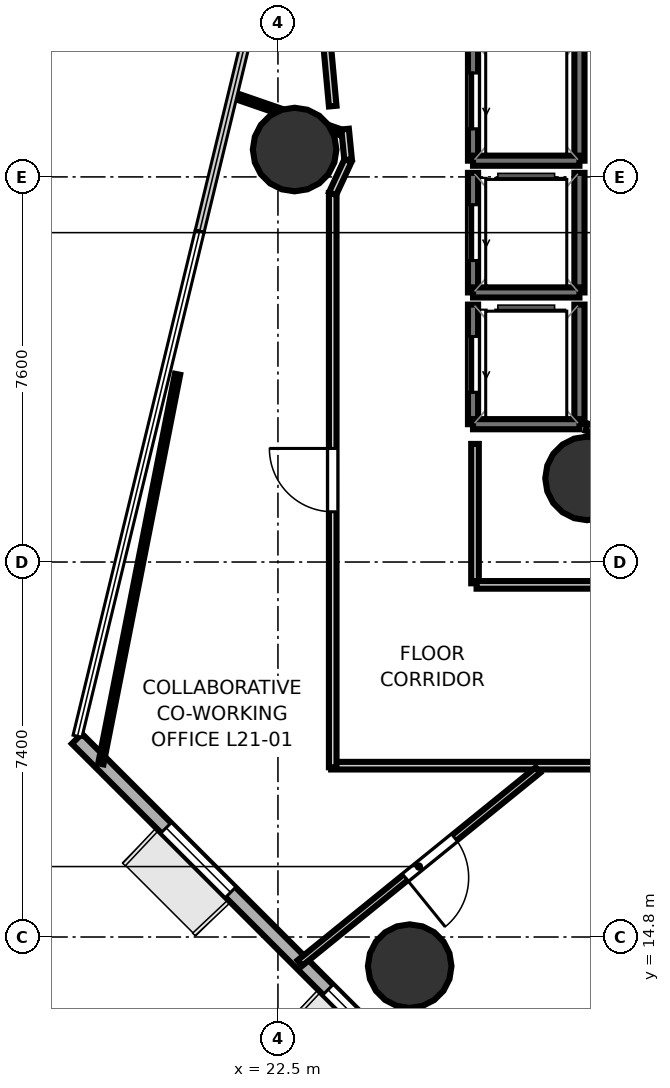
"""IFC4 building model, lengths in metres.
Left out: names, types, materials, properties, quantities, classifications, styles, units other than length and angle.
Written with IfcOpenShell. Run it as: python <this file> out.ifc"""

import sys

from ifc_helpers import new_model, si_unit, direction, frame, frame_2d, origin, origin_2d, place, context, subcontext, project, spatial, rectangle, hollow_circle, extrude, element, fill, save


model = new_model("IFC4")
c1 = context("Model", 3, precision=1e-05, world=origin(), true_north=direction((0.0, 1.0)))
c2 = subcontext(c1, "Body", "Model", "MODEL_VIEW")
j1 = project(units=[si_unit("LENGTHUNIT", "METRE"), si_unit("PLANEANGLEUNIT", "RADIAN")], contexts=[c1])
p1 = place(None, origin())
s1 = spatial("IfcSite", under=j1, at=p1, CompositionType="ELEMENT")
p2 = place(p1, origin())
s2 = spatial("IfcBuilding", under=s1, at=p2, CompositionType="ELEMENT")
p3 = place(p2, frame((0.0, 0.0, 85.8)))
s3 = spatial("IfcBuildingStorey", under=s2, at=p3, CompositionType="ELEMENT", Elevation=85.8)
for number, where, z_axis, x_axis in (
    (1, (28.6, 23.85, 0.0), (0.0, 0.0, 1.0), (1.0, 0.0, 0.0)),
    (2, (22.829, 30.34, 0.0), (0.0, 0.0, 1.0), (1.0, 0.0, 0.0)),
    (3, (25.1, 14.225, 0.0), (0.0, 0.0, 1.0), (1.0, 0.0, 0.0)),
):
    element("IfcColumn", number, at=place(p3, frame(where, z_axis=z_axis, x_axis=x_axis)), inside=s3, PredefinedType="COLUMN", context=c2, shape_type="SweptSolid", body=[
        extrude(hollow_circle(Radius=0.825, WallThickness=0.04, at=origin_2d()), origin(), (0.0, 0.0, 1.0), 3.7),
    ])
p4 = place(p3, frame((18.532, 18.713, 0.0), z_axis=(0.0, 0.0, 1.0), x_axis=(0.707279667922, -0.70693385217, 0.0)))
e4 = element("IfcWall", 4, at=p4, inside=s3, PredefinedType="SOLIDWALL", context=c2, shape_type="SweptSolid", body=[
    extrude(rectangle(XDim=11.296, YDim=0.28, at=frame_2d((5.648, 0.0))), origin(), (0.0, 0.0, 1.0), 3.52),
])
p5 = place(p4, frame((2.489, 0.0, 0.85)))
e5 = element("IfcOpeningElement", 5, at=p5, cuts=e4, PredefinedType="OPENING", context=c2, shape_type="SweptSolid", body=[
    extrude(rectangle(XDim=1.8, YDim=2.1, at=frame_2d((0.9, 1.05))), frame((0.0, 0.15, 0.0), z_axis=(0.0, -1.0, 0.0), x_axis=(1.0, 0.0, 0.0)), (0.0, 0.0, 1.0), 0.3),
])
p6 = place(p4, frame((7.007, 0.0, 0.85)))
e6 = element("IfcOpeningElement", 6, at=p6, cuts=e4, PredefinedType="OPENING", context=c2, shape_type="SweptSolid", body=[
    extrude(rectangle(XDim=1.8, YDim=2.1, at=frame_2d((0.9, 1.05))), frame((0.0, 0.15, 0.0), z_axis=(0.0, -1.0, 0.0), x_axis=(1.0, 0.0, 0.0)), (0.0, 0.0, 1.0), 0.3),
])
p7 = place(p3, frame((28.45, 30.12, 0.0), z_axis=(0.0, 0.0, 1.0), x_axis=(0.0, 1.0, 0.0)))
e7 = element("IfcWall", 7, at=p7, inside=s3, PredefinedType="SOLIDWALL", context=c2, shape_type="SweptSolid", body=[
    extrude(rectangle(XDim=2.36, YDim=0.2, at=frame_2d((1.18, 0.0))), origin(), (0.0, 0.0, 1.0), 3.52),
])
p8 = place(p3, frame((26.35, 30.12, 0.0), z_axis=(0.0, 0.0, 1.0), x_axis=(0.0, 1.0, 0.0)))
e8 = element("IfcWall", 8, at=p8, inside=s3, PredefinedType="SOLIDWALL", context=c2, shape_type="SweptSolid", body=[
    extrude(rectangle(XDim=2.36, YDim=0.2, at=frame_2d((1.18, 0.0))), origin(), (0.0, 0.0, 1.0), 3.52),
])
p9 = place(p8, frame((0.63, 0.0, 0.0)))
e9 = element("IfcOpeningElement", 9, at=p9, cuts=e8, PredefinedType="OPENING", context=c2, shape_type="SweptSolid", body=[
    extrude(rectangle(XDim=1.1, YDim=2.15, at=frame_2d((0.55, 1.075))), frame((0.0, 0.11, 0.0), z_axis=(0.0, -1.0, 0.0), x_axis=(1.0, 0.0, 0.0)), (0.0, 0.0, 1.0), 0.22),
])
p10 = place(p3, frame((26.35, 30.12, 0.0), z_axis=(0.0, 0.0, 1.0), x_axis=(1.0, 0.0, 0.0)))
e10 = element("IfcWall", 10, at=p10, inside=s3, PredefinedType="SOLIDWALL", context=c2, shape_type="SweptSolid", body=[
    extrude(rectangle(XDim=2.1, YDim=0.2, at=frame_2d((1.05, 0.0))), origin(), (0.0, 0.0, 1.0), 3.52),
])
p11 = place(p3, frame((28.45, 27.52, 0.0), z_axis=(0.0, 0.0, 1.0), x_axis=(0.0, 1.0, 0.0)))
e11 = element("IfcWall", 11, at=p11, inside=s3, PredefinedType="SOLIDWALL", context=c2, shape_type="SweptSolid", body=[
    extrude(rectangle(XDim=2.36, YDim=0.2, at=frame_2d((1.18, 0.0))), origin(), (0.0, 0.0, 1.0), 3.52),
])
p12 = place(p3, frame((26.35, 27.52, 0.0), z_axis=(0.0, 0.0, 1.0), x_axis=(0.0, 1.0, 0.0)))
e12 = element("IfcWall", 12, at=p12, inside=s3, PredefinedType="SOLIDWALL", context=c2, shape_type="SweptSolid", body=[
    extrude(rectangle(XDim=2.36, YDim=0.2, at=frame_2d((1.18, 0.0))), origin(), (0.0, 0.0, 1.0), 3.52),
])
p13 = place(p12, frame((0.63, 0.0, 0.0)))
e13 = element("IfcOpeningElement", 13, at=p13, cuts=e12, PredefinedType="OPENING", context=c2, shape_type="SweptSolid", body=[
    extrude(rectangle(XDim=1.1, YDim=2.15, at=frame_2d((0.55, 1.075))), frame((0.0, 0.11, 0.0), z_axis=(0.0, -1.0, 0.0), x_axis=(1.0, 0.0, 0.0)), (0.0, 0.0, 1.0), 0.22),
])
p14 = place(p3, frame((26.35, 27.52, 0.0), z_axis=(0.0, 0.0, 1.0), x_axis=(1.0, 0.0, 0.0)))
e14 = element("IfcWall", 14, at=p14, inside=s3, PredefinedType="SOLIDWALL", context=c2, shape_type="SweptSolid", body=[
    extrude(rectangle(XDim=2.1, YDim=0.2, at=frame_2d((1.05, 0.0))), origin(), (0.0, 0.0, 1.0), 3.52),
])
p15 = place(p3, frame((28.45, 24.92, 0.0), z_axis=(0.0, 0.0, 1.0), x_axis=(0.0, 1.0, 0.0)))
e15 = element("IfcWall", 15, at=p15, inside=s3, PredefinedType="SOLIDWALL", context=c2, shape_type="SweptSolid", body=[
    extrude(rectangle(XDim=2.36, YDim=0.2, at=frame_2d((1.18, 0.0))), origin(), (0.0, 0.0, 1.0), 3.52),
])
p16 = place(p3, frame((26.35, 24.92, 0.0), z_axis=(0.0, 0.0, 1.0), x_axis=(0.0, 1.0, 0.0)))
e16 = element("IfcWall", 16, at=p16, inside=s3, PredefinedType="SOLIDWALL", context=c2, shape_type="SweptSolid", body=[
    extrude(rectangle(XDim=2.36, YDim=0.2, at=frame_2d((1.18, 0.0))), origin(), (0.0, 0.0, 1.0), 3.52),
])
p17 = place(p16, frame((0.63, 0.0, 0.0)))
e17 = element("IfcOpeningElement", 17, at=p17, cuts=e16, PredefinedType="OPENING", context=c2, shape_type="SweptSolid", body=[
    extrude(rectangle(XDim=1.1, YDim=2.15, at=frame_2d((0.55, 1.075))), frame((0.0, 0.11, 0.0), z_axis=(0.0, -1.0, 0.0), x_axis=(1.0, 0.0, 0.0)), (0.0, 0.0, 1.0), 0.22),
])
p18 = place(p3, frame((26.35, 24.92, 0.0), z_axis=(0.0, 0.0, 1.0), x_axis=(1.0, 0.0, 0.0)))
e18 = element("IfcWall", 18, at=p18, inside=s3, PredefinedType="SOLIDWALL", context=c2, shape_type="SweptSolid", body=[
    extrude(rectangle(XDim=2.1, YDim=0.2, at=frame_2d((1.05, 0.0))), origin(), (0.0, 0.0, 1.0), 3.52),
])
p19 = place(p3, frame((29.13, 24.706, 0.0), z_axis=(0.0, 0.0, 1.0), x_axis=(-0.960451214223, 0.278448316742, 0.0)))
e19 = element("IfcWall", 19, at=p19, inside=s3, PredefinedType="PARTITIONING", context=c2, shape_type="SweptSolid", body=[
    extrude(rectangle(XDim=0.562, YDim=0.15, at=frame_2d((0.281, 0.0))), origin(), (0.0, 0.0, 1.0), 2.84),
])
p20 = place(p3, frame((23.581, 31.197, 0.0), z_axis=(0.0, 0.0, 1.0), x_axis=(-0.091643428087, 0.995791886936, 0.0)))
e20 = element("IfcWall", 20, at=p20, inside=s3, PredefinedType="PARTITIONING", context=c2, shape_type="SweptSolid", body=[
    extrude(rectangle(XDim=6.101, YDim=0.15, at=frame_2d((3.05, 0.0))), origin(), (0.0, 0.0, 1.0), 2.798),
])
p21 = place(p3, frame((26.389, 24.531, 0.0), z_axis=(0.0, 0.0, 1.0), x_axis=(0.0, -1.0, 0.0)))
e21 = element("IfcWall", 21, at=p21, inside=s3, PredefinedType="PARTITIONING", context=c2, shape_type="SweptSolid", body=[
    extrude(rectangle(XDim=2.75, YDim=0.15, at=frame_2d((1.375, 0.0))), origin(), (0.0, 0.0, 1.0), 2.84),
])
p22 = place(p3, frame((26.42, 21.749, 0.0), z_axis=(0.0, 0.0, 1.0), x_axis=(1.0, 0.0, 0.0)))
e22 = element("IfcWall", 22, at=p22, inside=s3, PredefinedType="PARTITIONING", context=c2, shape_type="SweptSolid", body=[
    extrude(rectangle(XDim=3.28, YDim=0.15, at=frame_2d((1.64, 0.0))), origin(), (0.0, 0.0, 1.0), 2.84),
])
p23 = place(p3, frame((33.32, 18.181, 0.0), z_axis=(0.0, 0.0, 1.0), x_axis=(-1.0, 0.0, 0.0)))
e23 = element("IfcWall", 23, at=p23, inside=s3, PredefinedType="PARTITIONING", context=c2, shape_type="SweptSolid", body=[
    extrude(rectangle(XDim=9.77, YDim=0.15, at=frame_2d((4.885, 0.0))), origin(), (0.0, 0.0, 1.0), 2.798),
])
p24 = place(p3, frame((23.581, 18.15, 0.0), z_axis=(0.0, 0.0, 1.0), x_axis=(0.0, 1.0, 0.0)))
e24 = element("IfcWall", 24, at=p24, inside=s3, PredefinedType="PARTITIONING", context=c2, shape_type="SweptSolid", body=[
    extrude(rectangle(XDim=11.333, YDim=0.15, at=frame_2d((5.667, 0.0))), origin(), (0.0, 0.0, 1.0), 2.798),
])
p25 = place(p24, frame((5.042, 0.0, 0.0)))
e25 = element("IfcOpeningElement", 25, at=p25, cuts=e24, PredefinedType="OPENING", context=c2, shape_type="SweptSolid", body=[
    extrude(rectangle(XDim=1.25, YDim=2.2, at=frame_2d((0.625, 1.1))), frame((0.0, 0.085, 0.0), z_axis=(0.0, -1.0, 0.0), x_axis=(1.0, 0.0, 0.0)), (0.0, 0.0, 1.0), 0.17),
])
p26 = place(p3, frame((23.578, 29.47, 0.0), z_axis=(0.0, 0.0, 1.0), x_axis=(0.421827918194, 0.906675910914, 0.0)))
e26 = element("IfcWall", 26, at=p26, inside=s3, PredefinedType="PARTITIONING", context=c2, shape_type="SweptSolid", body=[
    extrude(rectangle(XDim=0.72, YDim=0.15, at=frame_2d((0.36, 0.0))), origin(), (0.0, 0.0, 1.0), 2.84),
])
p27 = place(p3, frame((23.885, 30.139, 0.0), z_axis=(0.0, 0.0, 1.0), x_axis=(-0.0981888168, 0.995167803064, 0.0)))
e27 = element("IfcWall", 27, at=p27, inside=s3, PredefinedType="PARTITIONING", context=c2, shape_type="SweptSolid", body=[
    extrude(rectangle(XDim=0.607, YDim=0.15, at=frame_2d((0.303, 0.0))), origin(), (0.0, 0.0, 1.0), 2.84),
])
p28 = place(p3, frame((21.587, 31.424, 0.0), z_axis=(0.0, 0.0, 1.0), x_axis=(0.945103935005, -0.326769876271, 0.0)))
e28 = element("IfcWall", 28, at=p28, inside=s3, PredefinedType="PARTITIONING", context=c2, shape_type="SweptSolid", body=[
    extrude(rectangle(XDim=2.24, YDim=0.12, at=frame_2d((1.12, 0.0))), origin(), (0.0, 0.0, 1.0), 2.798),
])
p29 = place(p3, frame((27.631, 18.094, 0.0), z_axis=(0.0, 0.0, 1.0), x_axis=(-0.776847018992, -0.629689375076, 0.0)))
e29 = element("IfcWall", 29, at=p29, inside=s3, PredefinedType="PARTITIONING", context=c2, shape_type="SweptSolid", body=[
    extrude(rectangle(XDim=6.047, YDim=0.14, at=frame_2d((3.023, 0.0))), origin(), (0.0, 0.0, 1.0), 2.798),
])
p30 = place(p29, frame((2.119, 0.0, 0.0)))
e30 = element("IfcOpeningElement", 30, at=p30, cuts=e29, PredefinedType="OPENING", context=c2, shape_type="SweptSolid", body=[
    extrude(rectangle(XDim=1.25, YDim=2.2, at=frame_2d((0.625, 1.1))), frame((0.0, 0.08, 0.0), z_axis=(0.0, -1.0, 0.0), x_axis=(1.0, 0.0, 0.0)), (0.0, 0.0, 1.0), 0.16),
])
p31 = place(p3, frame((19.005, 18.217, 0.0), z_axis=(0.0, 0.0, 1.0), x_axis=(0.193233301583, 0.981152837819, 0.0)))
e31 = element("IfcWall", 31, at=p31, inside=s3, PredefinedType="PARTITIONING", context=c2, shape_type="SweptSolid", body=[
    extrude(rectangle(XDim=7.836, YDim=0.105, at=frame_2d((3.918, 0.0))), origin(), (0.0, 0.0, 1.0), 2.84),
])
p32 = place(p3, frame((55.851, 16.884, 0.0), z_axis=(0.0, 0.0, 1.0), x_axis=(-0.982440605196, -0.18657560736, 0.0)))
e32 = element("IfcWall", 32, at=p32, inside=s3, PredefinedType="PARTITIONING", context=c2, shape_type="SweptSolid", body=[
    extrude(rectangle(XDim=30.092, YDim=0.12, at=frame_2d((15.046, 0.0))), origin(), (0.0, 0.0, 1.0), 2.798),
])
p33 = place(p9, origin())
e33 = element("IfcDoor", 33, at=p33, inside=s3, OperationType="SLIDING_TO_LEFT", PredefinedType="DOOR", context=c2, shape_type="SweptSolid", body=[
    extrude(rectangle(XDim=1.1, YDim=2.15, at=frame_2d((0.55, 1.075))), frame((0.0, 0.025, 0.0), z_axis=(0.0, -1.0, 0.0), x_axis=(1.0, 0.0, 0.0)), (0.0, 0.0, 1.0), 0.05),
])
fill(e9, e33)
p34 = place(p13, origin())
e34 = element("IfcDoor", 34, at=p34, inside=s3, OperationType="SLIDING_TO_LEFT", PredefinedType="DOOR", context=c2, shape_type="SweptSolid", body=[
    extrude(rectangle(XDim=1.1, YDim=2.15, at=frame_2d((0.55, 1.075))), frame((0.0, 0.025, 0.0), z_axis=(0.0, -1.0, 0.0), x_axis=(1.0, 0.0, 0.0)), (0.0, 0.0, 1.0), 0.05),
])
fill(e13, e34)
p35 = place(p17, origin())
e35 = element("IfcDoor", 35, at=p35, inside=s3, OperationType="SLIDING_TO_LEFT", PredefinedType="DOOR", context=c2, shape_type="SweptSolid", body=[
    extrude(rectangle(XDim=1.1, YDim=2.15, at=frame_2d((0.55, 1.075))), frame((0.0, 0.025, 0.0), z_axis=(0.0, -1.0, 0.0), x_axis=(1.0, 0.0, 0.0)), (0.0, 0.0, 1.0), 0.05),
])
fill(e17, e35)
p36 = place(p25, origin())
e36 = element("IfcDoor", 36, at=p36, inside=s3, OperationType="SINGLE_SWING_RIGHT", PredefinedType="DOOR", context=c2, shape_type="SweptSolid", body=[
    extrude(rectangle(XDim=1.25, YDim=2.2, at=frame_2d((0.625, 1.1))), frame((0.0, 0.025, 0.0), z_axis=(0.0, -1.0, 0.0), x_axis=(1.0, 0.0, 0.0)), (0.0, 0.0, 1.0), 0.05),
])
fill(e25, e36)
p37 = place(p30, origin())
e37 = element("IfcDoor", 37, at=p37, inside=s3, OperationType="SINGLE_SWING_RIGHT", PredefinedType="DOOR", context=c2, shape_type="SweptSolid", body=[
    extrude(rectangle(XDim=1.25, YDim=2.2, at=frame_2d((0.625, 1.1))), frame((0.0, 0.025, 0.0), z_axis=(0.0, -1.0, 0.0), x_axis=(1.0, 0.0, 0.0)), (0.0, 0.0, 1.0), 0.05),
])
fill(e30, e37)
p38 = place(p5, origin())
e38 = element("IfcWindow", 38, at=p38, inside=s3, PartitioningType="SINGLE_PANEL", PredefinedType="WINDOW", context=c2, shape_type="SweptSolid", body=[
    extrude(rectangle(XDim=1.8, YDim=2.1, at=frame_2d((0.9, 1.05))), frame((0.0, 0.03, 0.0), z_axis=(0.0, -1.0, 0.0), x_axis=(1.0, 0.0, 0.0)), (0.0, 0.0, 1.0), 0.06),
])
fill(e5, e38)
p39 = place(p6, origin())
e39 = element("IfcWindow", 39, at=p39, inside=s3, PartitioningType="SINGLE_PANEL", PredefinedType="WINDOW", context=c2, shape_type="SweptSolid", body=[
    extrude(rectangle(XDim=1.8, YDim=2.1, at=frame_2d((0.9, 1.05))), frame((0.0, 0.03, 0.0), z_axis=(0.0, -1.0, 0.0), x_axis=(1.0, 0.0, 0.0)), (0.0, 0.0, 1.0), 0.06),
])
fill(e6, e39)
save(model, sys.argv[1])
